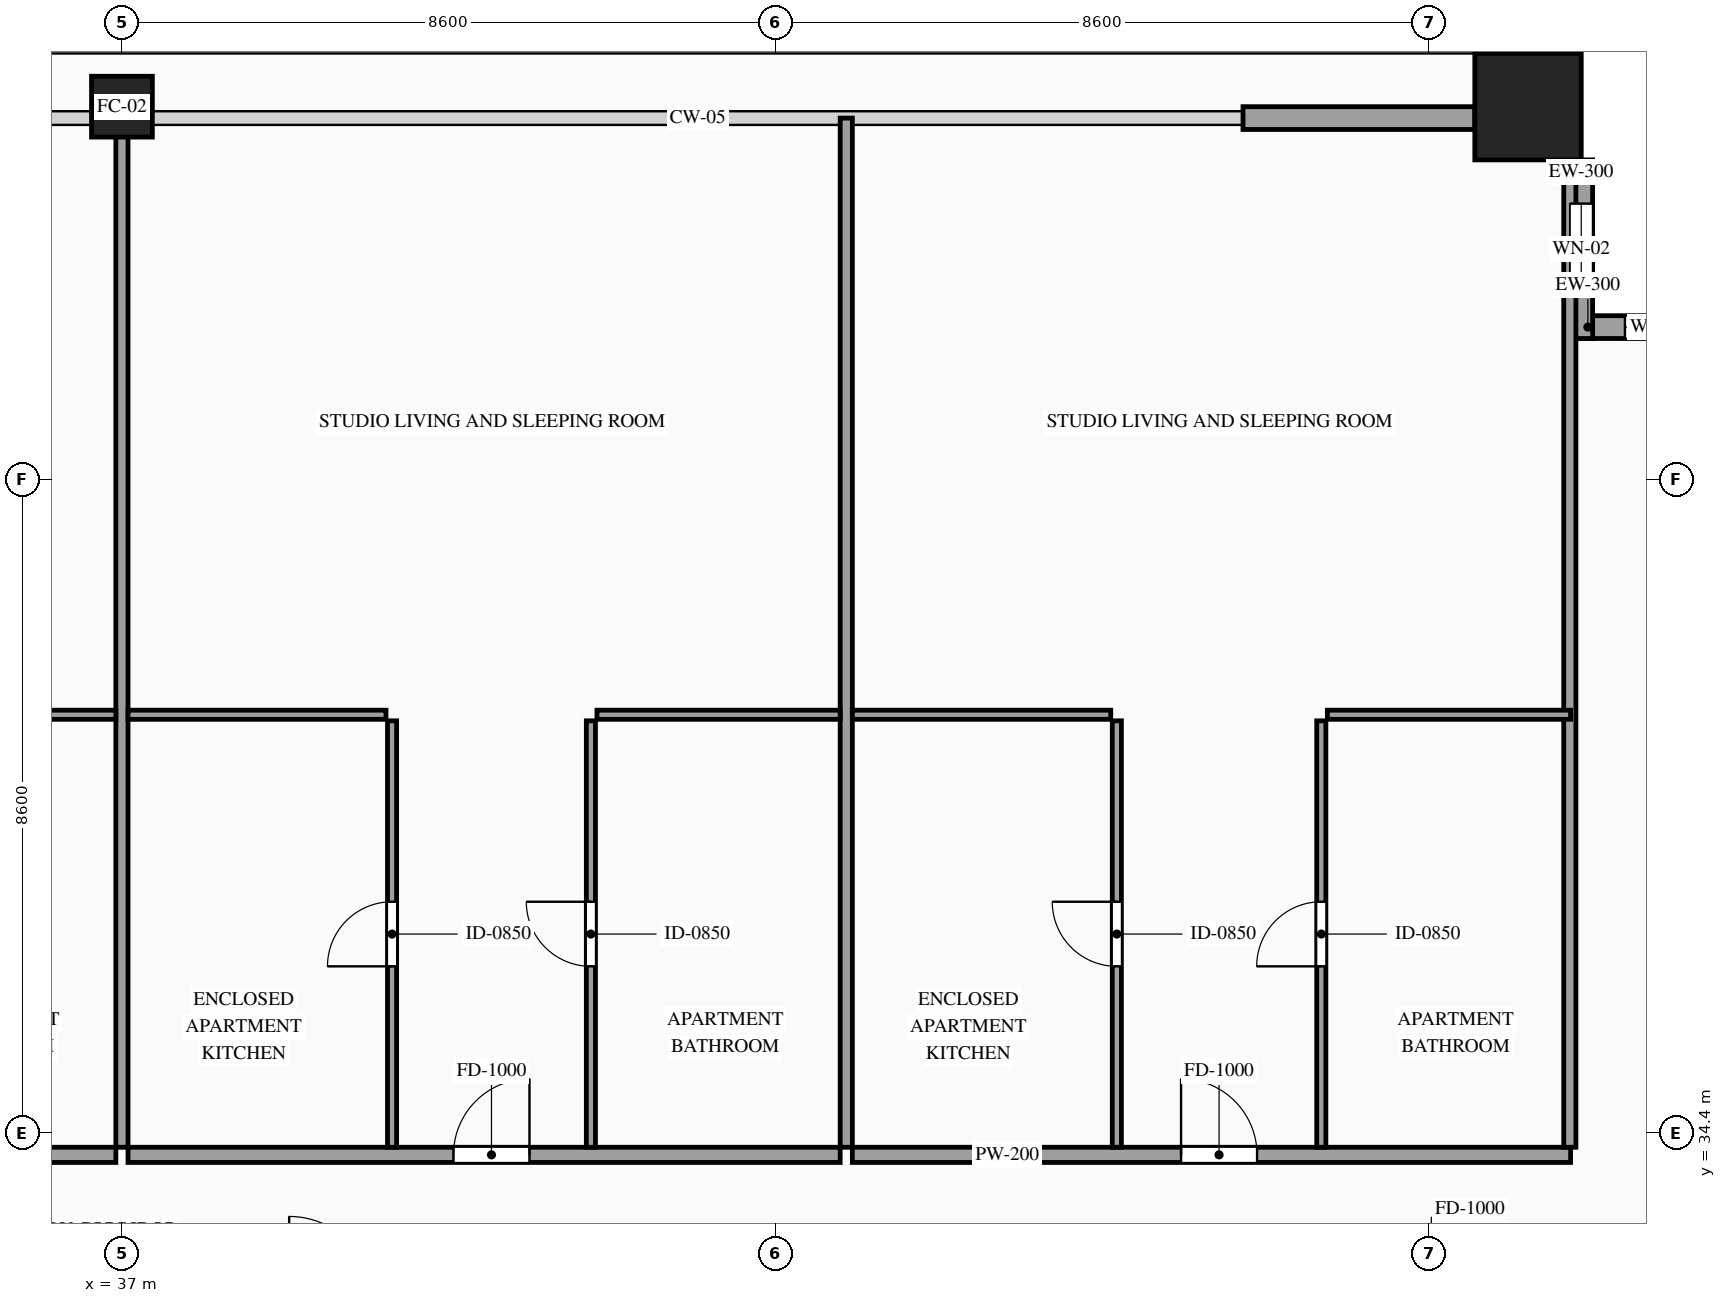
"""IFC4 building model, lengths in metres.
Left out: names, types, materials, properties, quantities, classifications, styles, units other than length and angle.
Written with IfcOpenShell. Run it as: python <this file> out.ifc"""

import sys

from ifc_helpers import new_model, si_unit, direction, frame, frame_2d, origin, origin_2d, place, context, subcontext, project, spatial, rectangle, hollow_rectangle, extrude, source, transform, mapped, element, fill, save


model = new_model("IFC4")
c1 = context("Model", 3, precision=1e-05, world=origin(), true_north=direction((0.0, 1.0)))
c2 = subcontext(c1, "Body", "Model", "MODEL_VIEW")
j1 = project(units=[si_unit("LENGTHUNIT", "METRE"), si_unit("PLANEANGLEUNIT", "RADIAN")], contexts=[c1])
p1 = place(None, origin())
s1 = spatial("IfcSite", under=j1, at=p1, CompositionType="ELEMENT")
p2 = place(p1, origin())
s2 = spatial("IfcBuilding", under=s1, at=p2, CompositionType="ELEMENT")
p3 = place(p2, frame((0.0, 0.0, 181.0)))
s3 = spatial("IfcBuildingStorey", under=s2, at=p3, CompositionType="ELEMENT", Elevation=181.0)
m1 = source(origin(), c2, "Body", "SweptSolid", [
    extrude(hollow_rectangle(XDim=0.8, YDim=0.8, WallThickness=0.036, at=origin_2d()), origin(), (0.0, 0.0, 1.0), 3.5),
])
p4 = place(p3, frame((37.0, 47.9, 0.0), z_axis=(0.0, 0.0, 1.0), x_axis=(1.0, 0.0, 0.0)))
e1 = element("IfcColumn", 1, at=p4, inside=s3, PredefinedType="COLUMN", context=c2, shape_type="MappedRepresentation", body=[
    mapped(m1, transform((0.0, 0.0, 0.0), scale=1.0)),
])
m2 = source(origin(), c2, "Body", "SweptSolid", [
    extrude(hollow_rectangle(XDim=1.4, YDim=1.4, WallThickness=0.06, at=origin_2d()), origin(), (0.0, 0.0, 1.0), 3.5),
])
p5 = place(p3, frame((55.5, 47.9, 0.0), z_axis=(0.0, 0.0, 1.0), x_axis=(1.0, 0.0, 0.0)))
e2 = element("IfcColumn", 2, at=p5, inside=s3, PredefinedType="COLUMN", context=c2, shape_type="MappedRepresentation", body=[
    mapped(m2, transform((0.0, 0.0, 0.0), scale=1.0)),
])
p6 = place(p3, frame((58.4, 45.0, 0.0), z_axis=(0.0, 0.0, 1.0), x_axis=(-1.0, 0.0, 0.0)))
e3 = element("IfcWall", 3, at=p6, inside=s3, PredefinedType="SOLIDWALL", context=c2, shape_type="SweptSolid", body=[
    extrude(rectangle(XDim=2.35, YDim=0.3, at=frame_2d((1.175, 0.0))), origin(), (0.0, 0.0, 1.0), 3.28),
])
p7 = place(p6, frame((0.725, 0.0, 0.85)))
e4 = element("IfcOpeningElement", 4, at=p7, cuts=e3, PredefinedType="OPENING", context=c2, shape_type="SweptSolid", body=[
    extrude(rectangle(XDim=0.9, YDim=1.5, at=frame_2d((0.45, 0.75))), frame((0.0, 0.165, 0.0), z_axis=(0.0, -1.0, 0.0), x_axis=(1.0, 0.0, 0.0)), (0.0, 0.0, 1.0), 0.33),
])
p8 = place(p3, frame((56.2, 44.85, 0.0), z_axis=(0.0, 0.0, 1.0), x_axis=(0.0, 1.0, 0.0)))
e5 = element("IfcWall", 5, at=p8, inside=s3, PredefinedType="SOLIDWALL", context=c2, shape_type="SweptSolid", body=[
    extrude(rectangle(XDim=2.35, YDim=0.3, at=frame_2d((1.175, 0.0))), origin(), (0.0, 0.0, 1.0), 3.28),
])
p9 = place(p8, frame((0.575, 0.0, 0.85)))
e6 = element("IfcOpeningElement", 6, at=p9, cuts=e5, PredefinedType="OPENING", context=c2, shape_type="SweptSolid", body=[
    extrude(rectangle(XDim=1.2, YDim=2.1, at=frame_2d((0.6, 1.05))), frame((0.0, 0.165, 0.0), z_axis=(0.0, -1.0, 0.0), x_axis=(1.0, 0.0, 0.0)), (0.0, 0.0, 1.0), 0.33),
])
m3 = source(origin(), c2, "Body", "SweptSolid", [
    extrude(rectangle(XDim=3.05, YDim=0.3, at=frame_2d((1.525, 0.0))), origin(), (0.0, 0.0, 1.0), 2.835),
])
p10 = place(p3, frame((51.75, 47.75, 0.0), z_axis=(0.0, 0.0, 1.0), x_axis=(1.0, 0.0, 0.0)))
e7 = element("IfcWall", 7, at=p10, inside=s3, PredefinedType="SOLIDWALL", context=c2, shape_type="MappedRepresentation", body=[
    mapped(m3, transform((0.0, 0.0, 0.0), scale=1.0)),
])
p11 = place(p3, frame((27.55, 34.11, 0.0), z_axis=(0.0, 0.0, 1.0), x_axis=(1.0, 0.0, 0.0)))
e8 = element("IfcWall", 8, at=p11, inside=s3, PredefinedType="PARTITIONING", context=c2, shape_type="SweptSolid", body=[
    extrude(rectangle(XDim=9.37, YDim=0.2, at=frame_2d((4.685, 0.0))), origin(), (0.0, 0.0, 1.0), 3.28),
])
p12 = place(p11, frame((4.282, 0.0, 0.0)))
e9 = element("IfcOpeningElement", 9, at=p12, cuts=e8, PredefinedType="OPENING", context=c2, shape_type="SweptSolid", body=[
    extrude(rectangle(XDim=1.0, YDim=2.2, at=frame_2d((0.5, 1.1))), frame((0.0, 0.115, 0.0), z_axis=(0.0, -1.0, 0.0), x_axis=(1.0, 0.0, 0.0)), (0.0, 0.0, 1.0), 0.23),
])
m4 = source(origin(), c2, "Body", "SweptSolid", [
    extrude(rectangle(XDim=13.54, YDim=0.16, at=frame_2d((6.77, 0.0))), origin(), (0.0, 0.0, 1.0), 2.687),
])
p13 = place(p3, frame((37.0, 34.21, 0.0), z_axis=(0.0, 0.0, 1.0), x_axis=(0.0, 1.0, 0.0)))
e10 = element("IfcWall", 10, at=p13, inside=s3, PredefinedType="PARTITIONING", context=c2, shape_type="MappedRepresentation", body=[
    mapped(m4, transform((0.0, 0.0, 0.0), scale=1.0)),
])
m5 = source(origin(), c2, "Body", "SweptSolid", [
    extrude(rectangle(XDim=3.2, YDim=0.12, at=frame_2d((1.6, 0.0))), origin(), (0.0, 0.0, 1.0), 2.875),
])
p14 = place(p3, frame((33.72, 39.9, 0.0), z_axis=(0.0, 0.0, 1.0), x_axis=(1.0, 0.0, 0.0)))
e11 = element("IfcWall", 11, at=p14, inside=s3, PredefinedType="PARTITIONING", context=c2, shape_type="MappedRepresentation", body=[
    mapped(m5, transform((0.0, 0.0, 0.0), scale=1.0)),
])
p15 = place(p3, frame((37.08, 34.11, 0.0), z_axis=(0.0, 0.0, 1.0), x_axis=(1.0, 0.0, 0.0)))
e12 = element("IfcWall", 12, at=p15, inside=s3, PredefinedType="PARTITIONING", context=c2, shape_type="SweptSolid", body=[
    extrude(rectangle(XDim=9.37, YDim=0.2, at=frame_2d((4.685, 0.0))), origin(), (0.0, 0.0, 1.0), 3.28),
])
p16 = place(p15, frame((4.282, 0.0, 0.0)))
e13 = element("IfcOpeningElement", 13, at=p16, cuts=e12, PredefinedType="OPENING", context=c2, shape_type="SweptSolid", body=[
    extrude(rectangle(XDim=1.0, YDim=2.2, at=frame_2d((0.5, 1.1))), frame((0.0, 0.115, 0.0), z_axis=(0.0, -1.0, 0.0), x_axis=(1.0, 0.0, 0.0)), (0.0, 0.0, 1.0), 0.23),
])
m6 = source(origin(), c2, "Body", "SweptSolid", [
    extrude(rectangle(XDim=13.54, YDim=0.16, at=frame_2d((6.77, 0.0))), origin(), (0.0, 0.0, 1.0), 3.28),
])
p17 = place(p3, frame((46.53, 34.21, 0.0), z_axis=(0.0, 0.0, 1.0), x_axis=(0.0, 1.0, 0.0)))
e14 = element("IfcWall", 14, at=p17, inside=s3, PredefinedType="PARTITIONING", context=c2, shape_type="MappedRepresentation", body=[
    mapped(m6, transform((0.0, 0.0, 0.0), scale=1.0)),
])
m7 = source(origin(), c2, "Body", "SweptSolid", [
    extrude(rectangle(XDim=3.394, YDim=0.12, at=frame_2d((1.697, 0.0))), origin(), (0.0, 0.0, 1.0), 2.875),
])
p18 = place(p3, frame((37.08, 39.9, 0.0), z_axis=(0.0, 0.0, 1.0), x_axis=(1.0, 0.0, 0.0)))
e15 = element("IfcWall", 15, at=p18, inside=s3, PredefinedType="PARTITIONING", context=c2, shape_type="MappedRepresentation", body=[
    mapped(m7, transform((0.0, 0.0, 0.0), scale=1.0)),
])
p19 = place(p3, frame((40.554, 34.21, 0.0), z_axis=(0.0, 0.0, 1.0), x_axis=(0.0, 1.0, 0.0)))
e16 = element("IfcWall", 16, at=p19, inside=s3, PredefinedType="PARTITIONING", context=c2, shape_type="SweptSolid", body=[
    extrude(rectangle(XDim=5.61, YDim=0.12, at=frame_2d((2.805, 0.0))), origin(), (0.0, 0.0, 1.0), 3.28),
])
p20 = place(p19, frame((2.38, 0.0, 0.0)))
e17 = element("IfcOpeningElement", 17, at=p20, cuts=e16, PredefinedType="OPENING", context=c2, shape_type="SweptSolid", body=[
    extrude(rectangle(XDim=0.85, YDim=2.1, at=frame_2d((0.425, 1.05))), frame((0.0, 0.075, 0.0), z_axis=(0.0, -1.0, 0.0), x_axis=(1.0, 0.0, 0.0)), (0.0, 0.0, 1.0), 0.15),
])
p21 = place(p3, frame((43.25, 39.9, 0.0), z_axis=(0.0, 0.0, 1.0), x_axis=(1.0, 0.0, 0.0)))
e18 = element("IfcWall", 18, at=p21, inside=s3, PredefinedType="PARTITIONING", context=c2, shape_type="MappedRepresentation", body=[
    mapped(m5, transform((0.0, 0.0, 0.0), scale=1.0)),
])
p22 = place(p3, frame((43.17, 34.21, 0.0), z_axis=(0.0, 0.0, 1.0), x_axis=(0.0, 1.0, 0.0)))
e19 = element("IfcWall", 19, at=p22, inside=s3, PredefinedType="PARTITIONING", context=c2, shape_type="SweptSolid", body=[
    extrude(rectangle(XDim=5.61, YDim=0.12, at=frame_2d((2.805, 0.0))), origin(), (0.0, 0.0, 1.0), 3.28),
])
p23 = place(p22, frame((2.38, 0.0, 0.0)))
e20 = element("IfcOpeningElement", 20, at=p23, cuts=e19, PredefinedType="OPENING", context=c2, shape_type="SweptSolid", body=[
    extrude(rectangle(XDim=0.85, YDim=2.1, at=frame_2d((0.425, 1.05))), frame((0.0, 0.075, 0.0), z_axis=(0.0, -1.0, 0.0), x_axis=(1.0, 0.0, 0.0)), (0.0, 0.0, 1.0), 0.15),
])
p24 = place(p3, frame((46.61, 34.11, 0.0), z_axis=(0.0, 0.0, 1.0), x_axis=(1.0, 0.0, 0.0)))
e21 = element("IfcWall", 21, at=p24, inside=s3, PredefinedType="PARTITIONING", context=c2, shape_type="SweptSolid", body=[
    extrude(rectangle(XDim=9.45, YDim=0.2, at=frame_2d((4.725, 0.0))), origin(), (0.0, 0.0, 1.0), 3.28),
])
p25 = place(p24, frame((4.325, 0.0, 0.0)))
e22 = element("IfcOpeningElement", 22, at=p25, cuts=e21, PredefinedType="OPENING", context=c2, shape_type="SweptSolid", body=[
    extrude(rectangle(XDim=1.0, YDim=2.2, at=frame_2d((0.5, 1.1))), frame((0.0, 0.115, 0.0), z_axis=(0.0, -1.0, 0.0), x_axis=(1.0, 0.0, 0.0)), (0.0, 0.0, 1.0), 0.23),
])
m8 = source(origin(), c2, "Body", "SweptSolid", [
    extrude(rectangle(XDim=13.39, YDim=0.16, at=frame_2d((6.695, 0.0))), origin(), (0.0, 0.0, 1.0), 3.28),
])
p26 = place(p3, frame((56.05, 34.21, 0.0), z_axis=(0.0, 0.0, 1.0), x_axis=(0.0, 1.0, 0.0)))
e23 = element("IfcWall", 23, at=p26, inside=s3, PredefinedType="PARTITIONING", context=c2, shape_type="MappedRepresentation", body=[
    mapped(m8, transform((0.0, 0.0, 0.0), scale=1.0)),
])
m9 = source(origin(), c2, "Body", "SweptSolid", [
    extrude(rectangle(XDim=3.4, YDim=0.12, at=frame_2d((1.7, 0.0))), origin(), (0.0, 0.0, 1.0), 2.875),
])
p27 = place(p3, frame((46.61, 39.9, 0.0), z_axis=(0.0, 0.0, 1.0), x_axis=(1.0, 0.0, 0.0)))
e24 = element("IfcWall", 24, at=p27, inside=s3, PredefinedType="PARTITIONING", context=c2, shape_type="MappedRepresentation", body=[
    mapped(m9, transform((0.0, 0.0, 0.0), scale=1.0)),
])
p28 = place(p3, frame((50.09, 34.21, 0.0), z_axis=(0.0, 0.0, 1.0), x_axis=(0.0, 1.0, 0.0)))
e25 = element("IfcWall", 25, at=p28, inside=s3, PredefinedType="PARTITIONING", context=c2, shape_type="SweptSolid", body=[
    extrude(rectangle(XDim=5.61, YDim=0.12, at=frame_2d((2.805, 0.0))), origin(), (0.0, 0.0, 1.0), 2.775),
])
p29 = place(p28, frame((2.38, 0.0, 0.0)))
e26 = element("IfcOpeningElement", 26, at=p29, cuts=e25, PredefinedType="OPENING", context=c2, shape_type="SweptSolid", body=[
    extrude(rectangle(XDim=0.85, YDim=2.1, at=frame_2d((0.425, 1.05))), frame((0.0, 0.075, 0.0), z_axis=(0.0, -1.0, 0.0), x_axis=(1.0, 0.0, 0.0)), (0.0, 0.0, 1.0), 0.15),
])
m10 = source(origin(), c2, "Body", "SweptSolid", [
    extrude(rectangle(XDim=3.2, YDim=0.12, at=frame_2d((1.6, 0.0))), origin(), (0.0, 0.0, 1.0), 3.28),
])
p30 = place(p3, frame((52.86, 39.9, 0.0), z_axis=(0.0, 0.0, 1.0), x_axis=(1.0, 0.0, 0.0)))
e27 = element("IfcWall", 27, at=p30, inside=s3, PredefinedType="PARTITIONING", context=c2, shape_type="MappedRepresentation", body=[
    mapped(m10, transform((0.0, 0.0, 0.0), scale=1.0)),
])
p31 = place(p3, frame((52.78, 34.21, 0.0), z_axis=(0.0, 0.0, 1.0), x_axis=(0.0, 1.0, 0.0)))
e28 = element("IfcWall", 28, at=p31, inside=s3, PredefinedType="PARTITIONING", context=c2, shape_type="SweptSolid", body=[
    extrude(rectangle(XDim=5.61, YDim=0.12, at=frame_2d((2.805, 0.0))), origin(), (0.0, 0.0, 1.0), 3.28),
])
p32 = place(p31, frame((2.38, 0.0, 0.0)))
e29 = element("IfcOpeningElement", 29, at=p32, cuts=e28, PredefinedType="OPENING", context=c2, shape_type="SweptSolid", body=[
    extrude(rectangle(XDim=0.85, YDim=2.1, at=frame_2d((0.425, 1.05))), frame((0.0, 0.075, 0.0), z_axis=(0.0, -1.0, 0.0), x_axis=(1.0, 0.0, 0.0)), (0.0, 0.0, 1.0), 0.15),
])
m11 = source(origin(), c2, "Body", "SweptSolid", [
    extrude(rectangle(XDim=0.9, YDim=1.5, at=frame_2d((0.45, 0.75))), frame((0.0, 0.03, 0.0), z_axis=(0.0, -1.0, 0.0), x_axis=(1.0, 0.0, 0.0)), (0.0, 0.0, 1.0), 0.06),
])
p33 = place(p7, origin())
e30 = element("IfcWindow", 30, at=p33, inside=s3, PartitioningType="SINGLE_PANEL", PredefinedType="WINDOW", context=c2, shape_type="MappedRepresentation", body=[
    mapped(m11, transform((0.0, 0.0, 0.0), scale=1.0)),
])
fill(e4, e30)
m12 = source(origin(), c2, "Body", "SweptSolid", [
    extrude(rectangle(XDim=1.2, YDim=2.1, at=frame_2d((0.6, 1.05))), frame((0.0, 0.03, 0.0), z_axis=(0.0, -1.0, 0.0), x_axis=(1.0, 0.0, 0.0)), (0.0, 0.0, 1.0), 0.06),
])
p34 = place(p9, origin())
e31 = element("IfcWindow", 31, at=p34, inside=s3, PartitioningType="SINGLE_PANEL", PredefinedType="WINDOW", context=c2, shape_type="MappedRepresentation", body=[
    mapped(m12, transform((0.0, 0.0, 0.0), scale=1.0)),
])
fill(e6, e31)
m13 = source(origin(), c2, "Body", "SweptSolid", [
    extrude(rectangle(XDim=1.0, YDim=2.2, at=frame_2d((0.5, 1.1))), frame((0.0, 0.025, 0.0), z_axis=(0.0, -1.0, 0.0), x_axis=(1.0, 0.0, 0.0)), (0.0, 0.0, 1.0), 0.05),
])
p35 = place(p16, origin())
e32 = element("IfcDoor", 32, at=p35, inside=s3, OperationType="SINGLE_SWING_RIGHT", PredefinedType="DOOR", context=c2, shape_type="MappedRepresentation", body=[
    mapped(m13, transform((0.0, 0.0, 0.0), scale=1.0)),
])
fill(e13, e32)
m14 = source(origin(), c2, "Body", "SweptSolid", [
    extrude(rectangle(XDim=0.85, YDim=2.1, at=frame_2d((0.425, 1.05))), frame((0.0, 0.025, 0.0), z_axis=(0.0, -1.0, 0.0), x_axis=(1.0, 0.0, 0.0)), (0.0, 0.0, 1.0), 0.05),
])
p36 = place(p20, origin())
e33 = element("IfcDoor", 33, at=p36, inside=s3, OperationType="SINGLE_SWING_LEFT", PredefinedType="DOOR", context=c2, shape_type="MappedRepresentation", body=[
    mapped(m14, transform((0.0, 0.0, 0.0), scale=1.0)),
])
fill(e17, e33)
p37 = place(p23, origin())
e34 = element("IfcDoor", 34, at=p37, inside=s3, OperationType="SINGLE_SWING_RIGHT", PredefinedType="DOOR", context=c2, shape_type="MappedRepresentation", body=[
    mapped(m14, transform((0.0, 0.0, 0.0), scale=1.0)),
])
fill(e20, e34)
p38 = place(p25, origin())
e35 = element("IfcDoor", 35, at=p38, inside=s3, OperationType="SINGLE_SWING_LEFT", PredefinedType="DOOR", context=c2, shape_type="MappedRepresentation", body=[
    mapped(m13, transform((0.0, 0.0, 0.0), scale=1.0)),
])
fill(e22, e35)
p39 = place(p29, origin())
e36 = element("IfcDoor", 36, at=p39, inside=s3, OperationType="SINGLE_SWING_RIGHT", PredefinedType="DOOR", context=c2, shape_type="MappedRepresentation", body=[
    mapped(m14, transform((0.0, 0.0, 0.0), scale=1.0)),
])
fill(e26, e36)
p40 = place(p32, origin())
e37 = element("IfcDoor", 37, at=p40, inside=s3, OperationType="SINGLE_SWING_LEFT", PredefinedType="DOOR", context=c2, shape_type="MappedRepresentation", body=[
    mapped(m14, transform((0.0, 0.0, 0.0), scale=1.0)),
])
fill(e29, e37)
save(model, sys.argv[1])
